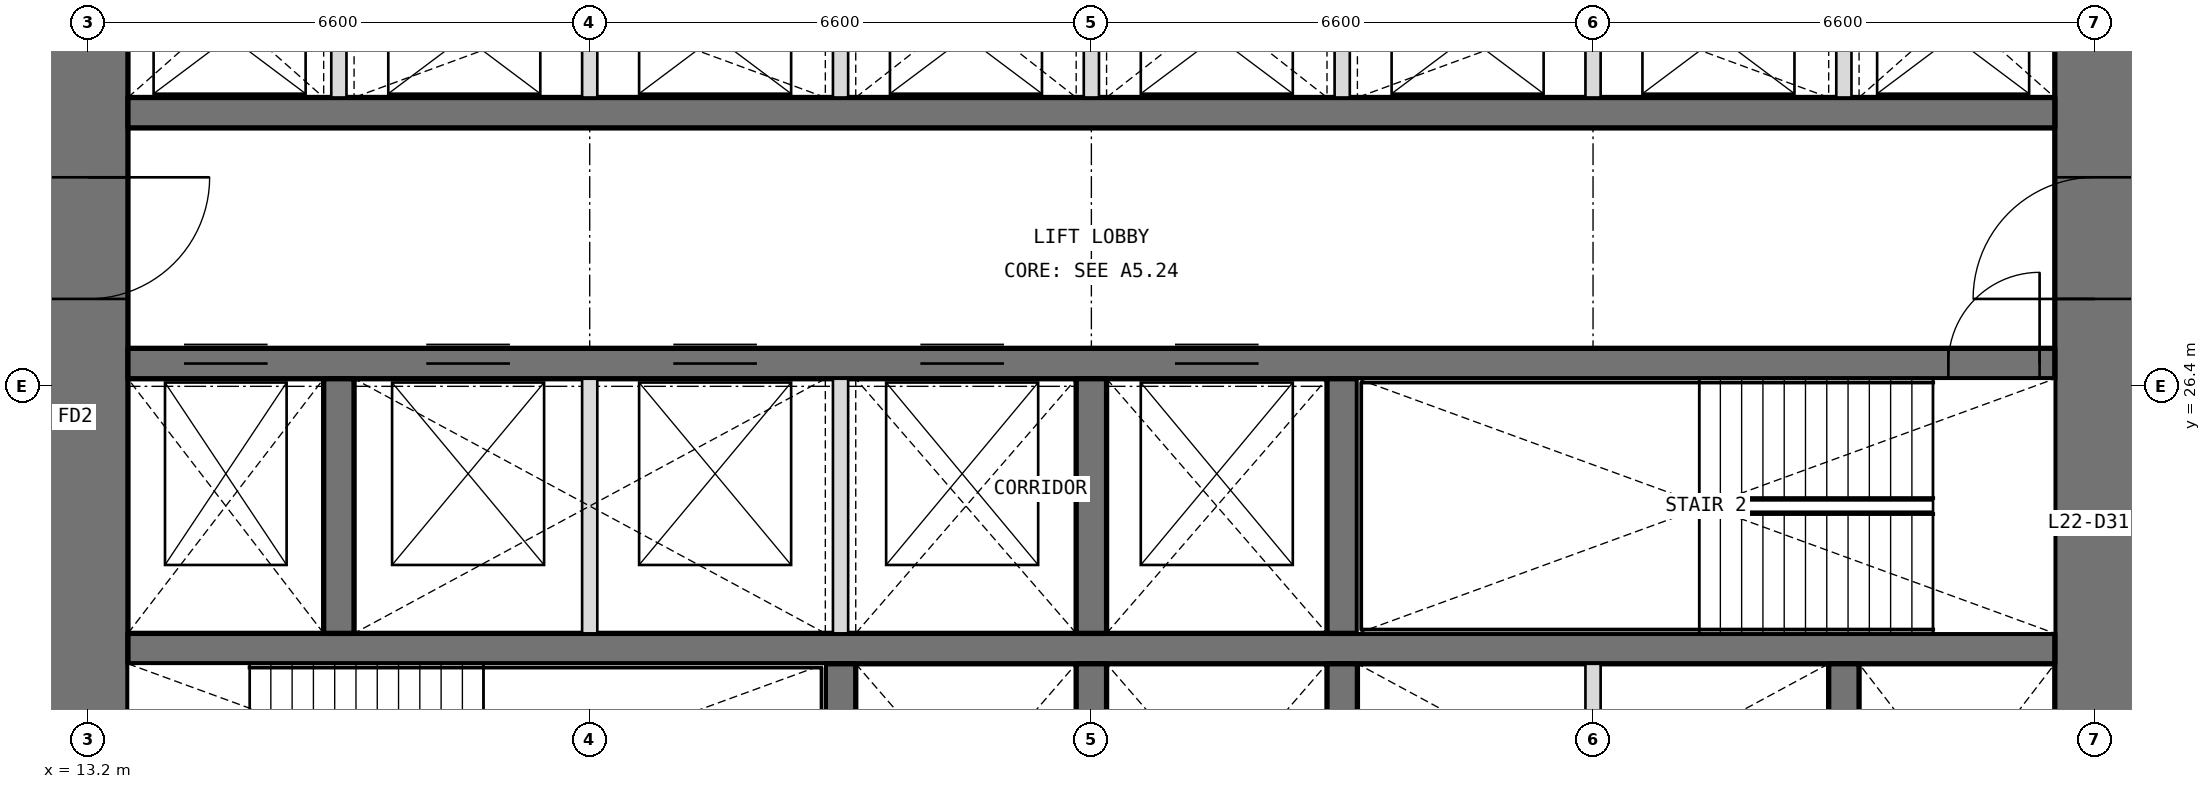
"""IFC4 building model, lengths in metres.
Left out: names, types, materials, properties, quantities, classifications, styles, units other than length and angle.
Written with IfcOpenShell. Run it as: python <this file> out.ifc"""

import sys

from ifc_helpers import new_model, si_unit, direction, frame, frame_2d, origin, place, context, subcontext, project, spatial, rectangle, extrude, element, fill, save


model = new_model("IFC4")
c1 = context("Model", 3, precision=1e-05, world=origin(), true_north=direction((0.0, 1.0)))
c2 = subcontext(c1, "Body", "Model", "MODEL_VIEW")
j1 = project(units=[si_unit("LENGTHUNIT", "METRE"), si_unit("PLANEANGLEUNIT", "RADIAN")], contexts=[c1])
p1 = place(None, origin())
s1 = spatial("IfcSite", under=j1, at=p1, CompositionType="ELEMENT")
p2 = place(p1, origin())
s2 = spatial("IfcBuilding", under=s1, at=p2, CompositionType="ELEMENT")
p3 = place(p2, frame((0.0, 0.0, 99.0)))
s3 = spatial("IfcBuildingStorey", under=s2, at=p3, CompositionType="ELEMENT", Elevation=99.0)
p4 = place(p3, frame((39.6, 13.725, 0.0), z_axis=(0.0, 0.0, 1.0), x_axis=(0.0, 1.0, 0.0)))
e1 = element("IfcWall", 1, at=p4, inside=s3, PredefinedType="SHEAR", context=c2, shape_type="SweptSolid", body=[
    extrude(rectangle(XDim=18.75, YDim=1.05, at=frame_2d((9.375, 0.0))), origin(), (0.0, 0.0, 1.0), 4.2),
])
p5 = place(p4, frame((3.025, 0.0, 0.0)))
e2 = element("IfcOpeningElement", 2, at=p5, cuts=e1, PredefinedType="OPENING", context=c2, shape_type="SweptSolid", body=[
    extrude(rectangle(XDim=1.6, YDim=2.1, at=frame_2d((0.8, 1.05))), frame((0.0, 0.535, 0.0), z_axis=(0.0, -1.0, 0.0), x_axis=(1.0, 0.0, 0.0)), (0.0, 0.0, 1.0), 1.07),
])
p6 = place(p4, frame((13.825, 0.0, 0.0)))
e3 = element("IfcOpeningElement", 3, at=p6, cuts=e1, PredefinedType="OPENING", context=c2, shape_type="SweptSolid", body=[
    extrude(rectangle(XDim=1.6, YDim=2.1, at=frame_2d((0.8, 1.05))), frame((0.0, 0.535, 0.0), z_axis=(0.0, -1.0, 0.0), x_axis=(1.0, 0.0, 0.0)), (0.0, 0.0, 1.0), 1.07),
])
p7 = place(p3, frame((13.2, 32.475, 0.0), z_axis=(0.0, 0.0, 1.0), x_axis=(0.0, -1.0, 0.0)))
e4 = element("IfcWall", 4, at=p7, inside=s3, PredefinedType="SHEAR", context=c2, shape_type="SweptSolid", body=[
    extrude(rectangle(XDim=18.75, YDim=1.05, at=frame_2d((9.375, 0.0))), origin(), (0.0, 0.0, 1.0), 4.2),
])
p8 = place(p7, frame((14.125, 0.0, 0.0)))
e5 = element("IfcOpeningElement", 5, at=p8, cuts=e4, PredefinedType="OPENING", context=c2, shape_type="SweptSolid", body=[
    extrude(rectangle(XDim=1.6, YDim=2.1, at=frame_2d((0.8, 1.05))), frame((0.0, 0.535, 0.0), z_axis=(0.0, -1.0, 0.0), x_axis=(1.0, 0.0, 0.0)), (0.0, 0.0, 1.0), 1.07),
])
p9 = place(p7, frame((3.325, 0.0, 0.0)))
e6 = element("IfcOpeningElement", 6, at=p9, cuts=e4, PredefinedType="OPENING", context=c2, shape_type="SweptSolid", body=[
    extrude(rectangle(XDim=1.6, YDim=2.1, at=frame_2d((0.8, 1.05))), frame((0.0, 0.535, 0.0), z_axis=(0.0, -1.0, 0.0), x_axis=(1.0, 0.0, 0.0)), (0.0, 0.0, 1.0), 1.07),
])
p10 = place(p3, frame((13.725, 22.95, 0.0), z_axis=(0.0, 0.0, 1.0), x_axis=(1.0, 0.0, 0.0)))
e7 = element("IfcWall", 7, at=p10, inside=s3, PredefinedType="SHEAR", context=c2, shape_type="SweptSolid", body=[
    extrude(rectangle(XDim=25.35, YDim=0.4, at=frame_2d((12.675, 0.0))), origin(), (0.0, 0.0, 1.0), 4.2),
])
p11 = place(p3, frame((13.725, 26.7, 0.0), z_axis=(0.0, 0.0, 1.0), x_axis=(1.0, 0.0, 0.0)))
e8 = element("IfcWall", 8, at=p11, inside=s3, PredefinedType="SHEAR", context=c2, shape_type="SweptSolid", body=[
    extrude(rectangle(XDim=25.35, YDim=0.4, at=frame_2d((12.675, 0.0))), origin(), (0.0, 0.0, 1.0), 4.2),
])
p12 = place(p11, frame((23.95, 0.0, 0.0)))
e9 = element("IfcOpeningElement", 9, at=p12, cuts=e8, PredefinedType="OPENING", context=c2, shape_type="SweptSolid", body=[
    extrude(rectangle(XDim=1.2, YDim=2.1, at=frame_2d((0.6, 1.05))), frame((0.0, 0.21, 0.0), z_axis=(0.0, -1.0, 0.0), x_axis=(1.0, 0.0, 0.0)), (0.0, 0.0, 1.0), 0.42),
])
p13 = place(p11, frame((0.738, 0.0, 0.0)))
e10 = element("IfcOpeningElement", 10, at=p13, cuts=e8, PredefinedType="OPENING", context=c2, shape_type="SweptSolid", body=[
    extrude(rectangle(XDim=1.1, YDim=2.1, at=frame_2d((0.55, 1.05))), frame((0.0, 0.21, 0.0), z_axis=(0.0, -1.0, 0.0), x_axis=(1.0, 0.0, 0.0)), (0.0, 0.0, 1.0), 0.42),
])
p14 = place(p11, frame((3.925, 0.0, 0.0)))
e11 = element("IfcOpeningElement", 11, at=p14, cuts=e8, PredefinedType="OPENING", context=c2, shape_type="SweptSolid", body=[
    extrude(rectangle(XDim=1.1, YDim=2.1, at=frame_2d((0.55, 1.05))), frame((0.0, 0.21, 0.0), z_axis=(0.0, -1.0, 0.0), x_axis=(1.0, 0.0, 0.0)), (0.0, 0.0, 1.0), 0.42),
])
p15 = place(p11, frame((7.175, 0.0, 0.0)))
e12 = element("IfcOpeningElement", 12, at=p15, cuts=e8, PredefinedType="OPENING", context=c2, shape_type="SweptSolid", body=[
    extrude(rectangle(XDim=1.1, YDim=2.1, at=frame_2d((0.55, 1.05))), frame((0.0, 0.21, 0.0), z_axis=(0.0, -1.0, 0.0), x_axis=(1.0, 0.0, 0.0)), (0.0, 0.0, 1.0), 0.42),
])
p16 = place(p11, frame((10.425, 0.0, 0.0)))
e13 = element("IfcOpeningElement", 13, at=p16, cuts=e8, PredefinedType="OPENING", context=c2, shape_type="SweptSolid", body=[
    extrude(rectangle(XDim=1.1, YDim=2.1, at=frame_2d((0.55, 1.05))), frame((0.0, 0.21, 0.0), z_axis=(0.0, -1.0, 0.0), x_axis=(1.0, 0.0, 0.0)), (0.0, 0.0, 1.0), 0.42),
])
p17 = place(p11, frame((13.775, 0.0, 0.0)))
e14 = element("IfcOpeningElement", 14, at=p17, cuts=e8, PredefinedType="OPENING", context=c2, shape_type="SweptSolid", body=[
    extrude(rectangle(XDim=1.1, YDim=2.1, at=frame_2d((0.55, 1.05))), frame((0.0, 0.21, 0.0), z_axis=(0.0, -1.0, 0.0), x_axis=(1.0, 0.0, 0.0)), (0.0, 0.0, 1.0), 0.42),
])
p18 = place(p3, frame((13.725, 30.0, 0.0), z_axis=(0.0, 0.0, 1.0), x_axis=(1.0, 0.0, 0.0)))
e15 = element("IfcWall", 15, at=p18, inside=s3, PredefinedType="SHEAR", context=c2, shape_type="SweptSolid", body=[
    extrude(rectangle(XDim=25.35, YDim=0.4, at=frame_2d((12.675, 0.0))), origin(), (0.0, 0.0, 1.0), 4.2),
])
for number, where, z_axis, x_axis in (
    (16, (23.1, 19.4, 0.0), (0.0, 0.0, 1.0), (0.0, 1.0, 0.0)),
    (17, (26.4, 19.4, 0.0), (0.0, 0.0, 1.0), (0.0, 1.0, 0.0)),
    (18, (29.7, 19.4, 0.0), (0.0, 0.0, 1.0), (0.0, 1.0, 0.0)),
    (19, (36.3, 19.4, 0.0), (0.0, 0.0, 1.0), (0.0, 1.0, 0.0)),
    (20, (16.5, 23.15, 0.0), (0.0, 0.0, 1.0), (0.0, 1.0, 0.0)),
    (21, (26.4, 23.15, 0.0), (0.0, 0.0, 1.0), (0.0, 1.0, 0.0)),
    (22, (29.7, 23.15, 0.0), (0.0, 0.0, 1.0), (0.0, 1.0, 0.0)),
):
    element("IfcWall", number, at=place(p3, frame(where, z_axis=z_axis, x_axis=x_axis)), inside=s3, PredefinedType="SHEAR", context=c2, shape_type="SweptSolid", body=[
        extrude(rectangle(XDim=3.35, YDim=0.4, at=frame_2d((1.675, 0.0))), origin(), (0.0, 0.0, 1.0), 4.2),
    ])
for number, where, z_axis, x_axis in (
    (23, (16.5, 30.2, 0.0), (0.0, 0.0, 1.0), (0.0, 1.0, 0.0)),
    (24, (19.8, 30.2, 0.0), (0.0, 0.0, 1.0), (0.0, 1.0, 0.0)),
    (25, (23.1, 30.2, 0.0), (0.0, 0.0, 1.0), (0.0, 1.0, 0.0)),
    (26, (26.4, 30.2, 0.0), (0.0, 0.0, 1.0), (0.0, 1.0, 0.0)),
    (27, (29.7, 30.2, 0.0), (0.0, 0.0, 1.0), (0.0, 1.0, 0.0)),
    (28, (33.0, 30.2, 0.0), (0.0, 0.0, 1.0), (0.0, 1.0, 0.0)),
    (29, (36.3, 30.2, 0.0), (0.0, 0.0, 1.0), (0.0, 1.0, 0.0)),
):
    element("IfcWall", number, at=place(p3, frame(where, z_axis=z_axis, x_axis=x_axis)), inside=s3, PredefinedType="PARTITIONING", context=c2, shape_type="SweptSolid", body=[
        extrude(rectangle(XDim=2.275, YDim=0.2, at=frame_2d((1.138, 0.0))), origin(), (0.0, 0.0, 1.0), 4.2),
    ])
for number, where, z_axis, x_axis in (
    (30, (33.0, 19.4, 0.0), (0.0, 0.0, 1.0), (0.0, 1.0, 0.0)),
    (31, (19.8, 23.15, 0.0), (0.0, 0.0, 1.0), (0.0, 1.0, 0.0)),
    (32, (23.1, 23.15, 0.0), (0.0, 0.0, 1.0), (0.0, 1.0, 0.0)),
):
    element("IfcWall", number, at=place(p3, frame(where, z_axis=z_axis, x_axis=x_axis)), inside=s3, PredefinedType="PARTITIONING", context=c2, shape_type="SweptSolid", body=[
        extrude(rectangle(XDim=3.35, YDim=0.2, at=frame_2d((1.675, 0.0))), origin(), (0.0, 0.0, 1.0), 4.2),
    ])
p19 = place(p12, origin())
e33 = element("IfcDoor", 33, at=p19, inside=s3, OperationType="SINGLE_SWING_RIGHT", PredefinedType="DOOR", context=c2, shape_type="SweptSolid", body=[
    extrude(rectangle(XDim=1.2, YDim=2.1, at=frame_2d((0.6, 1.05))), frame((0.0, 0.025, 0.0), z_axis=(0.0, -1.0, 0.0), x_axis=(1.0, 0.0, 0.0)), (0.0, 0.0, 1.0), 0.05),
])
fill(e9, e33)
p20 = place(p9, origin())
e34 = element("IfcDoor", 34, at=p20, inside=s3, OperationType="DOUBLE_DOOR_DOUBLE_SWING", PredefinedType="DOOR", context=c2, shape_type="SweptSolid", body=[
    extrude(rectangle(XDim=1.6, YDim=2.1, at=frame_2d((0.8, 1.05))), frame((0.0, 0.025, 0.0), z_axis=(0.0, -1.0, 0.0), x_axis=(1.0, 0.0, 0.0)), (0.0, 0.0, 1.0), 0.05),
])
fill(e6, e34)
p21 = place(p6, origin())
e35 = element("IfcDoor", 35, at=p21, inside=s3, OperationType="DOUBLE_DOOR_DOUBLE_SWING", PredefinedType="DOOR", context=c2, shape_type="SweptSolid", body=[
    extrude(rectangle(XDim=1.6, YDim=2.1, at=frame_2d((0.8, 1.05))), frame((0.0, 0.025, 0.0), z_axis=(0.0, -1.0, 0.0), x_axis=(1.0, 0.0, 0.0)), (0.0, 0.0, 1.0), 0.05),
])
fill(e3, e35)
p22 = place(p13, origin())
e36 = element("IfcDoor", 36, at=p22, inside=s3, OperationType="DOUBLE_DOOR_SLIDING", PredefinedType="DOOR", context=c2, shape_type="SweptSolid", body=[
    extrude(rectangle(XDim=1.1, YDim=2.1, at=frame_2d((0.55, 1.05))), frame((0.0, 0.025, 0.0), z_axis=(0.0, -1.0, 0.0), x_axis=(1.0, 0.0, 0.0)), (0.0, 0.0, 1.0), 0.05),
])
fill(e10, e36)
p23 = place(p14, origin())
e37 = element("IfcDoor", 37, at=p23, inside=s3, OperationType="DOUBLE_DOOR_SLIDING", PredefinedType="DOOR", context=c2, shape_type="SweptSolid", body=[
    extrude(rectangle(XDim=1.1, YDim=2.1, at=frame_2d((0.55, 1.05))), frame((0.0, 0.025, 0.0), z_axis=(0.0, -1.0, 0.0), x_axis=(1.0, 0.0, 0.0)), (0.0, 0.0, 1.0), 0.05),
])
fill(e11, e37)
p24 = place(p15, origin())
e38 = element("IfcDoor", 38, at=p24, inside=s3, OperationType="DOUBLE_DOOR_SLIDING", PredefinedType="DOOR", context=c2, shape_type="SweptSolid", body=[
    extrude(rectangle(XDim=1.1, YDim=2.1, at=frame_2d((0.55, 1.05))), frame((0.0, 0.025, 0.0), z_axis=(0.0, -1.0, 0.0), x_axis=(1.0, 0.0, 0.0)), (0.0, 0.0, 1.0), 0.05),
])
fill(e12, e38)
p25 = place(p16, origin())
e39 = element("IfcDoor", 39, at=p25, inside=s3, OperationType="DOUBLE_DOOR_SLIDING", PredefinedType="DOOR", context=c2, shape_type="SweptSolid", body=[
    extrude(rectangle(XDim=1.1, YDim=2.1, at=frame_2d((0.55, 1.05))), frame((0.0, 0.025, 0.0), z_axis=(0.0, -1.0, 0.0), x_axis=(1.0, 0.0, 0.0)), (0.0, 0.0, 1.0), 0.05),
])
fill(e13, e39)
p26 = place(p17, origin())
e40 = element("IfcDoor", 40, at=p26, inside=s3, OperationType="DOUBLE_DOOR_SLIDING", PredefinedType="DOOR", context=c2, shape_type="SweptSolid", body=[
    extrude(rectangle(XDim=1.1, YDim=2.1, at=frame_2d((0.55, 1.05))), frame((0.0, 0.025, 0.0), z_axis=(0.0, -1.0, 0.0), x_axis=(1.0, 0.0, 0.0)), (0.0, 0.0, 1.0), 0.05),
])
fill(e14, e40)
save(model, sys.argv[1])
